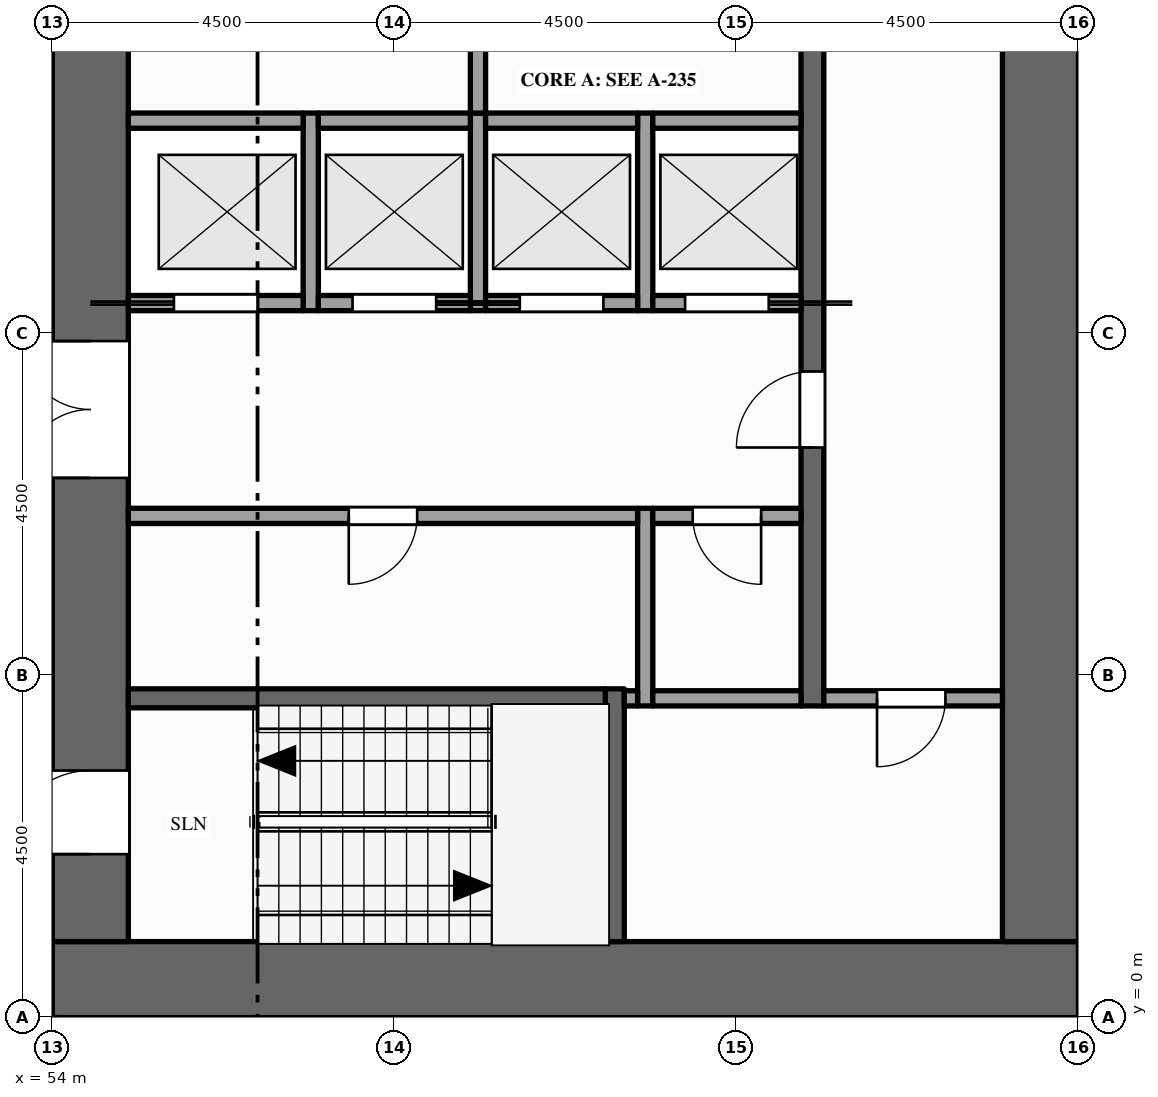
"""IFC4 building model, lengths in metres.
Left out: names, types, materials, properties, quantities, classifications, styles, units other than length and angle.
Written with IfcOpenShell. Run it as: python <this file> out.ifc"""

import sys

from ifc_helpers import new_model, si_unit, direction, frame, frame_2d, origin, place, context, subcontext, project, spatial, rectangle, extrude, element, fill, save


model = new_model("IFC4")
c1 = context("Model", 3, precision=1e-05, world=origin(), true_north=direction((0.0, 1.0)))
c2 = subcontext(c1, "Body", "Model", "MODEL_VIEW")
j1 = project(units=[si_unit("LENGTHUNIT", "METRE"), si_unit("PLANEANGLEUNIT", "RADIAN")], contexts=[c1])
p1 = place(None, origin())
s1 = spatial("IfcSite", under=j1, at=p1, CompositionType="ELEMENT")
p2 = place(p1, origin())
s2 = spatial("IfcBuilding", under=s1, at=p2, CompositionType="ELEMENT")
p3 = place(p2, frame((0.0, 0.0, 195.0)))
s3 = spatial("IfcBuildingStorey", under=s2, at=p3, CompositionType="ELEMENT", Elevation=195.0)
p4 = place(p3, frame((67.5, 0.5, -0.15), z_axis=(0.0, 0.0, 1.0), x_axis=(-1.0, 0.0, 0.0)))
e1 = element("IfcWall", 1, at=p4, inside=s3, PredefinedType="SHEAR", context=c2, shape_type="SweptSolid", body=[
    extrude(rectangle(XDim=13.5, YDim=1.0, at=frame_2d((6.75, 0.0))), origin(), (0.0, 0.0, 1.0), 4.0),
])
p5 = place(p3, frame((54.5, 1.0, -0.15), z_axis=(0.0, 0.0, 1.0), x_axis=(0.0, 1.0, 0.0)))
e2 = element("IfcWall", 2, at=p5, inside=s3, PredefinedType="SHEAR", context=c2, shape_type="SweptSolid", body=[
    extrude(rectangle(XDim=20.5, YDim=1.0, at=frame_2d((10.25, 0.0))), origin(), (0.0, 0.0, 1.0), 4.0),
])
p6 = place(p5, frame((6.1, 0.0, 0.15)))
e3 = element("IfcOpeningElement", 3, at=p6, cuts=e2, PredefinedType="OPENING", context=c2, shape_type="SweptSolid", body=[
    extrude(rectangle(XDim=1.8, YDim=2.1, at=frame_2d((0.9, 1.05))), frame((0.0, 0.51, 0.0), z_axis=(0.0, -1.0, 0.0), x_axis=(1.0, 0.0, 0.0)), (0.0, 0.0, 1.0), 1.02),
])
p7 = place(p5, frame((12.15, 0.0, 0.15)))
e4 = element("IfcOpeningElement", 4, at=p7, cuts=e2, PredefinedType="OPENING", context=c2, shape_type="SweptSolid", body=[
    extrude(rectangle(XDim=1.1, YDim=2.1, at=frame_2d((0.55, 1.05))), frame((0.0, 0.51, 0.0), z_axis=(0.0, -1.0, 0.0), x_axis=(1.0, 0.0, 0.0)), (0.0, 0.0, 1.0), 1.02),
])
p8 = place(p5, frame((1.15, 0.0, 0.15)))
e5 = element("IfcOpeningElement", 5, at=p8, cuts=e2, PredefinedType="OPENING", context=c2, shape_type="SweptSolid", body=[
    extrude(rectangle(XDim=1.1, YDim=2.1, at=frame_2d((0.55, 1.05))), frame((0.0, 0.51, 0.0), z_axis=(0.0, -1.0, 0.0), x_axis=(1.0, 0.0, 0.0)), (0.0, 0.0, 1.0), 1.02),
])
p9 = place(p5, frame((18.35, 0.0, 0.15)))
e6 = element("IfcOpeningElement", 6, at=p9, cuts=e2, PredefinedType="OPENING", context=c2, shape_type="SweptSolid", body=[
    extrude(rectangle(XDim=1.1, YDim=2.1, at=frame_2d((0.55, 1.05))), frame((0.0, 0.51, 0.0), z_axis=(0.0, -1.0, 0.0), x_axis=(1.0, 0.0, 0.0)), (0.0, 0.0, 1.0), 1.02),
])
p10 = place(p3, frame((67.0, 1.0, -0.15), z_axis=(0.0, 0.0, 1.0), x_axis=(0.0, 1.0, 0.0)))
e7 = element("IfcWall", 7, at=p10, inside=s3, PredefinedType="SHEAR", context=c2, shape_type="SweptSolid", body=[
    extrude(rectangle(XDim=20.5, YDim=1.0, at=frame_2d((10.25, 0.0))), origin(), (0.0, 0.0, 1.0), 4.0),
])
for number, where, z_axis, x_axis in (
    (8, (57.4, 9.3, 0.0), (0.0, 0.0, 1.0), (0.0, 1.0, 0.0)),
    (9, (59.6, 9.3, 0.0), (0.0, 0.0, 1.0), (0.0, 1.0, 0.0)),
):
    element("IfcWall", number, at=place(p3, frame(where, z_axis=z_axis, x_axis=x_axis)), inside=s3, PredefinedType="SOLIDWALL", context=c2, shape_type="SweptSolid", body=[
        extrude(rectangle(XDim=2.6, YDim=0.2, at=frame_2d((1.3, 0.0))), origin(), (0.0, 0.0, 1.0), 3.85),
    ])
p11 = place(p3, frame((59.6, 11.9, 0.0), z_axis=(0.0, 0.0, 1.0), x_axis=(0.0, 1.0, 0.0)))
e10 = element("IfcWall", 10, at=p11, inside=s3, PredefinedType="PARTITIONING", context=c2, shape_type="SweptSolid", body=[
    extrude(rectangle(XDim=3.6, YDim=0.2, at=frame_2d((1.8, 0.0))), origin(), (0.0, 0.0, 1.0), 3.85),
])
p12 = place(p11, frame((1.3, 0.0, 0.0)))
e11 = element("IfcOpeningElement", 11, at=p12, cuts=e10, PredefinedType="OPENING", context=c2, shape_type="SweptSolid", body=[
    extrude(rectangle(XDim=1.0, YDim=2.1, at=frame_2d((0.5, 1.05))), frame((0.0, 0.11, 0.0), z_axis=(0.0, -1.0, 0.0), x_axis=(1.0, 0.0, 0.0)), (0.0, 0.0, 1.0), 0.22),
])
p13 = place(p3, frame((61.4, 1.0, 0.0), z_axis=(0.0, 0.0, 1.0), x_axis=(0.0, 1.0, 0.0)))
e12 = element("IfcWall", 12, at=p13, inside=s3, PredefinedType="SHEAR", context=c2, shape_type="SweptSolid", body=[
    extrude(rectangle(XDim=3.325, YDim=0.25, at=frame_2d((1.663, 0.0))), origin(), (0.0, 0.0, 1.0), 3.85),
])
p14 = place(p3, frame((61.8, 4.1, 0.0), z_axis=(0.0, 0.0, 1.0), x_axis=(0.0, 1.0, 0.0)))
e13 = element("IfcWall", 13, at=p14, inside=s3, PredefinedType="PARTITIONING", context=c2, shape_type="SweptSolid", body=[
    extrude(rectangle(XDim=2.6, YDim=0.2, at=frame_2d((1.3, 0.0))), origin(), (0.0, 0.0, 1.0), 3.85),
])
p15 = place(p3, frame((61.8, 9.3, 0.0), z_axis=(0.0, 0.0, 1.0), x_axis=(0.0, 1.0, 0.0)))
e14 = element("IfcWall", 14, at=p15, inside=s3, PredefinedType="SOLIDWALL", context=c2, shape_type="SweptSolid", body=[
    extrude(rectangle(XDim=2.6, YDim=0.2, at=frame_2d((1.3, 0.0))), origin(), (0.0, 0.0, 1.0), 3.85),
])
p16 = place(p3, frame((64.0, 4.1, 0.0), z_axis=(0.0, 0.0, 1.0), x_axis=(0.0, 1.0, 0.0)))
e15 = element("IfcWall", 15, at=p16, inside=s3, PredefinedType="SHEAR", context=c2, shape_type="SweptSolid", body=[
    extrude(rectangle(XDim=14.5, YDim=0.3, at=frame_2d((7.25, 0.0))), origin(), (0.0, 0.0, 1.0), 3.85),
])
p17 = place(p16, frame((3.4, 0.0, 0.0)))
e16 = element("IfcOpeningElement", 16, at=p17, cuts=e15, PredefinedType="OPENING", context=c2, shape_type="SweptSolid", body=[
    extrude(rectangle(XDim=1.0, YDim=2.1, at=frame_2d((0.5, 1.05))), frame((0.0, 0.16, 0.0), z_axis=(0.0, -1.0, 0.0), x_axis=(1.0, 0.0, 0.0)), (0.0, 0.0, 1.0), 0.32),
])
p18 = place(p16, frame((9.1, 0.0, 0.0)))
e17 = element("IfcOpeningElement", 17, at=p18, cuts=e15, PredefinedType="OPENING", context=c2, shape_type="SweptSolid", body=[
    extrude(rectangle(XDim=1.0, YDim=2.1, at=frame_2d((0.5, 1.05))), frame((0.0, 0.16, 0.0), z_axis=(0.0, -1.0, 0.0), x_axis=(1.0, 0.0, 0.0)), (0.0, 0.0, 1.0), 0.32),
])
p19 = place(p3, frame((55.0, 4.2, 0.0), z_axis=(0.0, 0.0, 1.0), x_axis=(1.0, 0.0, 0.0)))
e18 = element("IfcWall", 18, at=p19, inside=s3, PredefinedType="SHEAR", context=c2, shape_type="SweptSolid", body=[
    extrude(rectangle(XDim=6.275, YDim=0.25, at=frame_2d((3.137, 0.0))), origin(), (0.0, 0.0, 1.0), 3.85),
])
p20 = place(p3, frame((61.525, 4.2, 0.0), z_axis=(0.0, 0.0, 1.0), x_axis=(1.0, 0.0, 0.0)))
e19 = element("IfcWall", 19, at=p20, inside=s3, PredefinedType="PARTITIONING", context=c2, shape_type="SweptSolid", body=[
    extrude(rectangle(XDim=0.175, YDim=0.2, at=frame_2d((0.087, 0.0))), origin(), (0.0, 0.0, 1.0), 3.85),
])
p21 = place(p3, frame((61.9, 4.2, 0.0), z_axis=(0.0, 0.0, 1.0), x_axis=(1.0, 0.0, 0.0)))
e20 = element("IfcWall", 20, at=p21, inside=s3, PredefinedType="PARTITIONING", context=c2, shape_type="SweptSolid", body=[
    extrude(rectangle(XDim=1.95, YDim=0.2, at=frame_2d((0.975, 0.0))), origin(), (0.0, 0.0, 1.0), 3.85),
])
p22 = place(p3, frame((64.15, 4.2, 0.0), z_axis=(0.0, 0.0, 1.0), x_axis=(1.0, 0.0, 0.0)))
e21 = element("IfcWall", 21, at=p22, inside=s3, PredefinedType="PARTITIONING", context=c2, shape_type="SweptSolid", body=[
    extrude(rectangle(XDim=2.35, YDim=0.2, at=frame_2d((1.175, 0.0))), origin(), (0.0, 0.0, 1.0), 3.85),
])
p23 = place(p22, frame((0.7, 0.0, 0.0)))
e22 = element("IfcOpeningElement", 22, at=p23, cuts=e21, PredefinedType="OPENING", context=c2, shape_type="SweptSolid", body=[
    extrude(rectangle(XDim=0.9, YDim=2.1, at=frame_2d((0.45, 1.05))), frame((0.0, 0.11, 0.0), z_axis=(0.0, -1.0, 0.0), x_axis=(1.0, 0.0, 0.0)), (0.0, 0.0, 1.0), 0.22),
])
p24 = place(p3, frame((55.0, 6.6, 0.0), z_axis=(0.0, 0.0, 1.0), x_axis=(1.0, 0.0, 0.0)))
e23 = element("IfcWall", 23, at=p24, inside=s3, PredefinedType="PARTITIONING", context=c2, shape_type="SweptSolid", body=[
    extrude(rectangle(XDim=6.7, YDim=0.2, at=frame_2d((3.35, 0.0))), origin(), (0.0, 0.0, 1.0), 3.85),
])
p25 = place(p24, frame((2.9, 0.0, 0.0)))
e24 = element("IfcOpeningElement", 24, at=p25, cuts=e23, PredefinedType="OPENING", context=c2, shape_type="SweptSolid", body=[
    extrude(rectangle(XDim=0.9, YDim=2.1, at=frame_2d((0.45, 1.05))), frame((0.0, 0.11, 0.0), z_axis=(0.0, -1.0, 0.0), x_axis=(1.0, 0.0, 0.0)), (0.0, 0.0, 1.0), 0.22),
])
p26 = place(p3, frame((61.9, 6.6, 0.0), z_axis=(0.0, 0.0, 1.0), x_axis=(1.0, 0.0, 0.0)))
e25 = element("IfcWall", 25, at=p26, inside=s3, PredefinedType="PARTITIONING", context=c2, shape_type="SweptSolid", body=[
    extrude(rectangle(XDim=1.95, YDim=0.2, at=frame_2d((0.975, 0.0))), origin(), (0.0, 0.0, 1.0), 3.85),
])
p27 = place(p26, frame((0.525, 0.0, 0.0)))
e26 = element("IfcOpeningElement", 26, at=p27, cuts=e25, PredefinedType="OPENING", context=c2, shape_type="SweptSolid", body=[
    extrude(rectangle(XDim=0.9, YDim=2.1, at=frame_2d((0.45, 1.05))), frame((0.0, 0.11, 0.0), z_axis=(0.0, -1.0, 0.0), x_axis=(1.0, 0.0, 0.0)), (0.0, 0.0, 1.0), 0.22),
])
p28 = place(p3, frame((55.0, 9.4, 0.0), z_axis=(0.0, 0.0, 1.0), x_axis=(1.0, 0.0, 0.0)))
e27 = element("IfcWall", 27, at=p28, inside=s3, PredefinedType="SOLIDWALL", context=c2, shape_type="SweptSolid", body=[
    extrude(rectangle(XDim=2.3, YDim=0.2, at=frame_2d((1.15, 0.0))), origin(), (0.0, 0.0, 1.0), 3.85),
])
p29 = place(p28, frame((0.6, 0.0, 0.012)))
e28 = element("IfcOpeningElement", 28, at=p29, cuts=e27, PredefinedType="OPENING", context=c2, shape_type="SweptSolid", body=[
    extrude(rectangle(XDim=1.1, YDim=2.1, at=frame_2d((0.55, 1.05))), frame((0.0, 0.11, 0.0), z_axis=(0.0, -1.0, 0.0), x_axis=(1.0, 0.0, 0.0)), (0.0, 0.0, 1.0), 0.22),
])
p30 = place(p3, frame((57.5, 9.4, 0.0), z_axis=(0.0, 0.0, 1.0), x_axis=(1.0, 0.0, 0.0)))
e29 = element("IfcWall", 29, at=p30, inside=s3, PredefinedType="SOLIDWALL", context=c2, shape_type="SweptSolid", body=[
    extrude(rectangle(XDim=2.0, YDim=0.2, at=frame_2d((1.0, 0.0))), origin(), (0.0, 0.0, 1.0), 3.85),
])
p31 = place(p30, frame((0.45, 0.0, 0.012)))
e30 = element("IfcOpeningElement", 30, at=p31, cuts=e29, PredefinedType="OPENING", context=c2, shape_type="SweptSolid", body=[
    extrude(rectangle(XDim=1.1, YDim=2.1, at=frame_2d((0.55, 1.05))), frame((0.0, 0.11, 0.0), z_axis=(0.0, -1.0, 0.0), x_axis=(1.0, 0.0, 0.0)), (0.0, 0.0, 1.0), 0.22),
])
p32 = place(p3, frame((59.7, 9.4, 0.0), z_axis=(0.0, 0.0, 1.0), x_axis=(1.0, 0.0, 0.0)))
e31 = element("IfcWall", 31, at=p32, inside=s3, PredefinedType="SOLIDWALL", context=c2, shape_type="SweptSolid", body=[
    extrude(rectangle(XDim=2.0, YDim=0.2, at=frame_2d((1.0, 0.0))), origin(), (0.0, 0.0, 1.0), 3.85),
])
p33 = place(p32, frame((0.45, 0.0, 0.012)))
e32 = element("IfcOpeningElement", 32, at=p33, cuts=e31, PredefinedType="OPENING", context=c2, shape_type="SweptSolid", body=[
    extrude(rectangle(XDim=1.1, YDim=2.1, at=frame_2d((0.55, 1.05))), frame((0.0, 0.11, 0.0), z_axis=(0.0, -1.0, 0.0), x_axis=(1.0, 0.0, 0.0)), (0.0, 0.0, 1.0), 0.22),
])
p34 = place(p3, frame((61.9, 9.4, 0.0), z_axis=(0.0, 0.0, 1.0), x_axis=(1.0, 0.0, 0.0)))
e33 = element("IfcWall", 33, at=p34, inside=s3, PredefinedType="SOLIDWALL", context=c2, shape_type="SweptSolid", body=[
    extrude(rectangle(XDim=1.95, YDim=0.2, at=frame_2d((0.975, 0.0))), origin(), (0.0, 0.0, 1.0), 3.85),
])
p35 = place(p34, frame((0.425, 0.0, 0.012)))
e34 = element("IfcOpeningElement", 34, at=p35, cuts=e33, PredefinedType="OPENING", context=c2, shape_type="SweptSolid", body=[
    extrude(rectangle(XDim=1.1, YDim=2.1, at=frame_2d((0.55, 1.05))), frame((0.0, 0.11, 0.0), z_axis=(0.0, -1.0, 0.0), x_axis=(1.0, 0.0, 0.0)), (0.0, 0.0, 1.0), 0.22),
])
p36 = place(p3, frame((55.0, 11.8, 0.0), z_axis=(0.0, 0.0, 1.0), x_axis=(1.0, 0.0, 0.0)))
e35 = element("IfcWall", 35, at=p36, inside=s3, PredefinedType="SOLIDWALL", context=c2, shape_type="SweptSolid", body=[
    extrude(rectangle(XDim=2.3, YDim=0.2, at=frame_2d((1.15, 0.0))), origin(), (0.0, 0.0, 1.0), 3.85),
])
for number, where, z_axis, x_axis in (
    (36, (57.5, 11.8, 0.0), (0.0, 0.0, 1.0), (1.0, 0.0, 0.0)),
    (37, (59.7, 11.8, 0.0), (0.0, 0.0, 1.0), (1.0, 0.0, 0.0)),
):
    element("IfcWall", number, at=place(p3, frame(where, z_axis=z_axis, x_axis=x_axis)), inside=s3, PredefinedType="SOLIDWALL", context=c2, shape_type="SweptSolid", body=[
        extrude(rectangle(XDim=2.0, YDim=0.2, at=frame_2d((1.0, 0.0))), origin(), (0.0, 0.0, 1.0), 3.85),
    ])
p37 = place(p3, frame((61.9, 11.8, 0.0), z_axis=(0.0, 0.0, 1.0), x_axis=(1.0, 0.0, 0.0)))
e38 = element("IfcWall", 38, at=p37, inside=s3, PredefinedType="SOLIDWALL", context=c2, shape_type="SweptSolid", body=[
    extrude(rectangle(XDim=1.95, YDim=0.2, at=frame_2d((0.975, 0.0))), origin(), (0.0, 0.0, 1.0), 3.85),
])
p38 = place(p29, origin())
e39 = element("IfcDoor", 39, at=p38, inside=s3, OperationType="SLIDING_TO_LEFT", PredefinedType="DOOR", context=c2, shape_type="SweptSolid", body=[
    extrude(rectangle(XDim=1.1, YDim=2.1, at=frame_2d((0.55, 1.05))), frame((0.0, 0.025, 0.0), z_axis=(0.0, -1.0, 0.0), x_axis=(1.0, 0.0, 0.0)), (0.0, 0.0, 1.0), 0.05),
])
fill(e28, e39)
p39 = place(p31, origin())
e40 = element("IfcDoor", 40, at=p39, inside=s3, OperationType="SLIDING_TO_RIGHT", PredefinedType="DOOR", context=c2, shape_type="SweptSolid", body=[
    extrude(rectangle(XDim=1.1, YDim=2.1, at=frame_2d((0.55, 1.05))), frame((0.0, 0.025, 0.0), z_axis=(0.0, -1.0, 0.0), x_axis=(1.0, 0.0, 0.0)), (0.0, 0.0, 1.0), 0.05),
])
fill(e30, e40)
p40 = place(p33, origin())
e41 = element("IfcDoor", 41, at=p40, inside=s3, OperationType="SLIDING_TO_LEFT", PredefinedType="DOOR", context=c2, shape_type="SweptSolid", body=[
    extrude(rectangle(XDim=1.1, YDim=2.1, at=frame_2d((0.55, 1.05))), frame((0.0, 0.025, 0.0), z_axis=(0.0, -1.0, 0.0), x_axis=(1.0, 0.0, 0.0)), (0.0, 0.0, 1.0), 0.05),
])
fill(e32, e41)
p41 = place(p35, origin())
e42 = element("IfcDoor", 42, at=p41, inside=s3, OperationType="SLIDING_TO_RIGHT", PredefinedType="DOOR", context=c2, shape_type="SweptSolid", body=[
    extrude(rectangle(XDim=1.1, YDim=2.1, at=frame_2d((0.55, 1.05))), frame((0.0, 0.025, 0.0), z_axis=(0.0, -1.0, 0.0), x_axis=(1.0, 0.0, 0.0)), (0.0, 0.0, 1.0), 0.05),
])
fill(e34, e42)
p42 = place(p6, origin())
e43 = element("IfcDoor", 43, at=p42, inside=s3, OperationType="DOUBLE_DOOR_SINGLE_SWING", PredefinedType="DOOR", context=c2, shape_type="SweptSolid", body=[
    extrude(rectangle(XDim=1.8, YDim=2.1, at=frame_2d((0.9, 1.05))), frame((0.0, 0.025, 0.0), z_axis=(0.0, -1.0, 0.0), x_axis=(1.0, 0.0, 0.0)), (0.0, 0.0, 1.0), 0.05),
])
fill(e3, e43)
p43 = place(p17, origin())
e44 = element("IfcDoor", 44, at=p43, inside=s3, OperationType="SINGLE_SWING_LEFT", PredefinedType="DOOR", context=c2, shape_type="SweptSolid", body=[
    extrude(rectangle(XDim=1.0, YDim=2.1, at=frame_2d((0.5, 1.05))), frame((0.0, 0.025, 0.0), z_axis=(0.0, -1.0, 0.0), x_axis=(1.0, 0.0, 0.0)), (0.0, 0.0, 1.0), 0.05),
])
fill(e16, e44)
p44 = place(p8, origin())
e45 = element("IfcDoor", 45, at=p44, inside=s3, OperationType="SINGLE_SWING_LEFT", PredefinedType="DOOR", context=c2, shape_type="SweptSolid", body=[
    extrude(rectangle(XDim=1.1, YDim=2.1, at=frame_2d((0.55, 1.05))), frame((0.0, 0.025, 0.0), z_axis=(0.0, -1.0, 0.0), x_axis=(1.0, 0.0, 0.0)), (0.0, 0.0, 1.0), 0.05),
])
fill(e5, e45)
p45 = place(p23, origin())
e46 = element("IfcDoor", 46, at=p45, inside=s3, OperationType="SINGLE_SWING_LEFT", PredefinedType="DOOR", context=c2, shape_type="SweptSolid", body=[
    extrude(rectangle(XDim=0.9, YDim=2.1, at=frame_2d((0.45, 1.05))), frame((0.0, 0.025, 0.0), z_axis=(0.0, -1.0, 0.0), x_axis=(1.0, 0.0, 0.0)), (0.0, 0.0, 1.0), 0.05),
])
fill(e22, e46)
p46 = place(p25, origin())
e47 = element("IfcDoor", 47, at=p46, inside=s3, OperationType="SINGLE_SWING_LEFT", PredefinedType="DOOR", context=c2, shape_type="SweptSolid", body=[
    extrude(rectangle(XDim=0.9, YDim=2.1, at=frame_2d((0.45, 1.05))), frame((0.0, 0.025, 0.0), z_axis=(0.0, -1.0, 0.0), x_axis=(1.0, 0.0, 0.0)), (0.0, 0.0, 1.0), 0.05),
])
fill(e24, e47)
p47 = place(p27, origin())
e48 = element("IfcDoor", 48, at=p47, inside=s3, OperationType="SINGLE_SWING_RIGHT", PredefinedType="DOOR", context=c2, shape_type="SweptSolid", body=[
    extrude(rectangle(XDim=0.9, YDim=2.1, at=frame_2d((0.45, 1.05))), frame((0.0, 0.025, 0.0), z_axis=(0.0, -1.0, 0.0), x_axis=(1.0, 0.0, 0.0)), (0.0, 0.0, 1.0), 0.05),
])
fill(e26, e48)
save(model, sys.argv[1])
